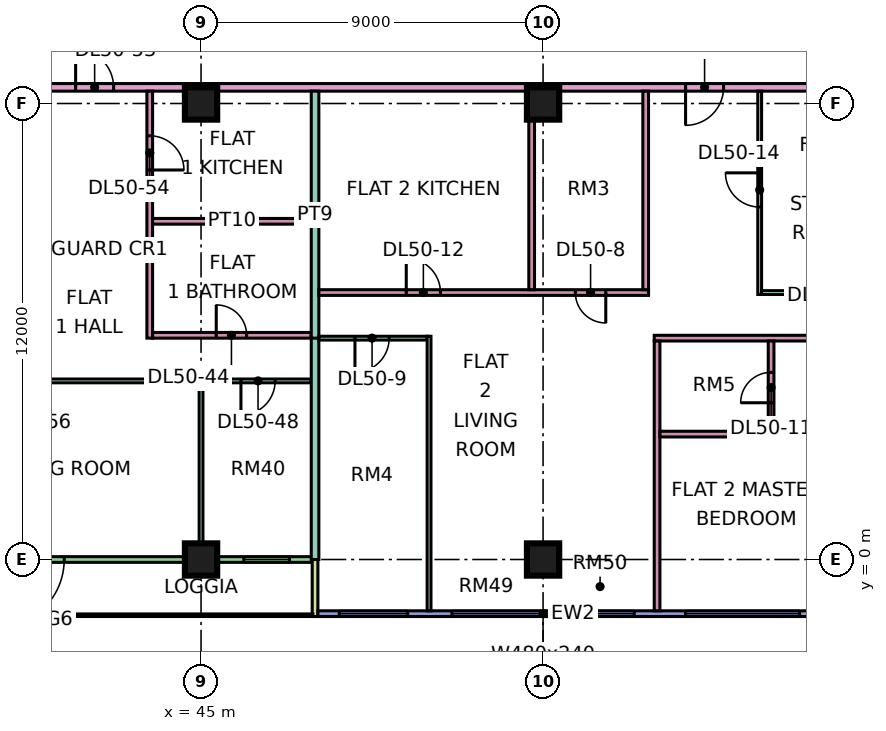
"""IFC4 building model, lengths in metres.
Left out: names, types, materials, properties, quantities, classifications, styles, units other than length and angle.
Written with IfcOpenShell. Run it as: python <this file> out.ifc"""

import sys

from ifc_helpers import new_model, si_unit, direction, frame, frame_2d, origin, origin_2d, place, context, subcontext, project, spatial, rectangle, extrude, element, fill, save


model = new_model("IFC4")
c1 = context("Model", 3, precision=1e-05, world=origin(), true_north=direction((0.0, 1.0)))
c2 = subcontext(c1, "Body", "Model", "MODEL_VIEW")
j1 = project(units=[si_unit("LENGTHUNIT", "METRE"), si_unit("PLANEANGLEUNIT", "RADIAN")], contexts=[c1])
p1 = place(None, origin())
s1 = spatial("IfcSite", under=j1, at=p1, CompositionType="ELEMENT")
p2 = place(p1, origin())
s2 = spatial("IfcBuilding", under=s1, at=p2, CompositionType="ELEMENT")
p3 = place(p2, frame((0.0, 0.0, 215.4)))
s3 = spatial("IfcBuildingStorey", under=s2, at=p3, CompositionType="ELEMENT", Elevation=215.4)
for number, where, z_axis, x_axis in (
    (1, (45.0, 0.0, 0.0), (0.0, 0.0, 1.0), (1.0, 0.0, 0.0)),
    (2, (45.0, 12.0, 0.0), (0.0, 0.0, 1.0), (1.0, 0.0, 0.0)),
    (3, (54.0, 0.0, 0.0), (0.0, 0.0, 1.0), (1.0, 0.0, 0.0)),
    (4, (54.0, 12.0, 0.0), (0.0, 0.0, 1.0), (1.0, 0.0, 0.0)),
):
    element("IfcColumn", number, at=place(p3, frame(where, z_axis=z_axis, x_axis=x_axis)), inside=s3, PredefinedType="COLUMN", context=c2, shape_type="SweptSolid", body=[
        extrude(rectangle(XDim=0.85, YDim=0.85, at=origin_2d()), origin(), (0.0, 0.0, 1.0), 3.75),
    ])
p4 = place(p3, frame((36.075, 0.0, 0.0), z_axis=(0.0, 0.0, 1.0), x_axis=(1.0, 0.0, 0.0)))
e5 = element("IfcWall", 5, at=p4, inside=s3, PredefinedType="SOLIDWALL", context=c2, shape_type="SweptSolid", body=[
    extrude(rectangle(XDim=11.85, YDim=0.15, at=frame_2d((5.925, 0.0))), origin(), (0.0, 0.0, 1.0), 3.35),
])
p5 = place(p4, frame((3.525, 0.0, 0.0)))
e6 = element("IfcOpeningElement", 6, at=p5, cuts=e5, PredefinedType="OPENING", context=c2, shape_type="SweptSolid", body=[
    extrude(rectangle(XDim=1.8, YDim=2.4, at=frame_2d((0.9, 1.2))), frame((0.0, 0.085, 0.0), z_axis=(0.0, -1.0, 0.0), x_axis=(1.0, 0.0, 0.0)), (0.0, 0.0, 1.0), 0.17),
])
p6 = place(p4, frame((10.05, 0.0, 0.45)))
e7 = element("IfcOpeningElement", 7, at=p6, cuts=e5, PredefinedType="OPENING", context=c2, shape_type="SweptSolid", body=[
    extrude(rectangle(XDim=1.2, YDim=2.4, at=frame_2d((0.6, 1.2))), frame((0.0, 0.085, 0.0), z_axis=(0.0, -1.0, 0.0), x_axis=(1.0, 0.0, 0.0)), (0.0, 0.0, 1.0), 0.17),
])
p7 = place(p3, frame((48.0, -1.5, 0.0), z_axis=(0.0, 0.0, 1.0), x_axis=(0.0, 1.0, 0.0)))
e8 = element("IfcWall", 8, at=p7, inside=s3, PredefinedType="SOLIDWALL", context=c2, shape_type="SweptSolid", body=[
    extrude(rectangle(XDim=1.5, YDim=0.15, at=frame_2d((0.75, 0.0))), origin(), (0.0, 0.0, 1.0), 3.35),
])
p8 = place(p3, frame((48.075, -1.425, 0.0), z_axis=(0.0, 0.0, 1.0), x_axis=(1.0, 0.0, 0.0)))
e9 = element("IfcWall", 9, at=p8, inside=s3, PredefinedType="SOLIDWALL", context=c2, shape_type="SweptSolid", body=[
    extrude(rectangle(XDim=13.425, YDim=0.15, at=frame_2d((6.712, 0.0))), origin(), (0.0, 0.0, 1.0), 3.35),
])
p9 = place(p8, frame((0.562, 0.0, 0.45)))
e10 = element("IfcOpeningElement", 10, at=p9, cuts=e9, PredefinedType="OPENING", context=c2, shape_type="SweptSolid", body=[
    extrude(rectangle(XDim=1.8, YDim=2.4, at=frame_2d((0.9, 1.2))), frame((0.0, 0.085, 0.0), z_axis=(0.0, -1.0, 0.0), x_axis=(1.0, 0.0, 0.0)), (0.0, 0.0, 1.0), 0.17),
])
p10 = place(p8, frame((3.525, 0.0, 0.45)))
e11 = element("IfcOpeningElement", 11, at=p10, cuts=e9, PredefinedType="OPENING", context=c2, shape_type="SweptSolid", body=[
    extrude(rectangle(XDim=4.8, YDim=2.4, at=frame_2d((2.4, 1.2))), frame((0.0, 0.085, 0.0), z_axis=(0.0, -1.0, 0.0), x_axis=(1.0, 0.0, 0.0)), (0.0, 0.0, 1.0), 0.17),
])
p11 = place(p8, frame((9.675, 0.0, 0.45)))
e12 = element("IfcOpeningElement", 12, at=p11, cuts=e9, PredefinedType="OPENING", context=c2, shape_type="SweptSolid", body=[
    extrude(rectangle(XDim=3.0, YDim=2.4, at=frame_2d((1.5, 1.2))), frame((0.0, 0.085, 0.0), z_axis=(0.0, -1.0, 0.0), x_axis=(1.0, 0.0, 0.0)), (0.0, 0.0, 1.0), 0.17),
])
p12 = place(p3, frame((33.05, 4.7, 0.0), z_axis=(0.0, 0.0, 1.0), x_axis=(1.0, 0.0, 0.0)))
e13 = element("IfcWall", 13, at=p12, inside=s3, PredefinedType="PARTITIONING", context=c2, shape_type="SweptSolid", body=[
    extrude(rectangle(XDim=14.85, YDim=0.1, at=frame_2d((7.425, 0.0))), origin(), (0.0, 0.0, 1.0), 3.35),
])
p13 = place(p12, frame((1.0, 0.0, 0.0)))
e14 = element("IfcOpeningElement", 14, at=p13, cuts=e13, PredefinedType="OPENING", context=c2, shape_type="SweptSolid", body=[
    extrude(rectangle(XDim=0.9, YDim=2.1, at=frame_2d((0.45, 1.05))), frame((0.0, 0.06, 0.0), z_axis=(0.0, -1.0, 0.0), x_axis=(1.0, 0.0, 0.0)), (0.0, 0.0, 1.0), 0.12),
])
p14 = place(p12, frame((13.0, 0.0, 0.0)))
e15 = element("IfcOpeningElement", 15, at=p14, cuts=e13, PredefinedType="OPENING", context=c2, shape_type="SweptSolid", body=[
    extrude(rectangle(XDim=0.9, YDim=2.1, at=frame_2d((0.45, 1.05))), frame((0.0, 0.06, 0.0), z_axis=(0.0, -1.0, 0.0), x_axis=(1.0, 0.0, 0.0)), (0.0, 0.0, 1.0), 0.12),
])
p15 = place(p12, frame((7.0, 0.0, 0.0)))
e16 = element("IfcOpeningElement", 16, at=p15, cuts=e13, PredefinedType="OPENING", context=c2, shape_type="SweptSolid", body=[
    extrude(rectangle(XDim=0.9, YDim=2.1, at=frame_2d((0.45, 1.05))), frame((0.0, 0.06, 0.0), z_axis=(0.0, -1.0, 0.0), x_axis=(1.0, 0.0, 0.0)), (0.0, 0.0, 1.0), 0.12),
])
p16 = place(p3, frame((40.65, 12.425, 0.0), z_axis=(0.0, 0.0, 1.0), x_axis=(1.0, 0.0, 0.0)))
e17 = element("IfcWall", 17, at=p16, inside=s3, PredefinedType="PARTITIONING", context=c2, shape_type="SweptSolid", body=[
    extrude(rectangle(XDim=22.276, YDim=0.2, at=frame_2d((11.138, 0.0))), origin(), (0.0, 0.0, 1.0), 3.35),
])
p17 = place(p16, frame((17.1, 0.0, 0.0)))
e18 = element("IfcOpeningElement", 18, at=p17, cuts=e17, PredefinedType="OPENING", context=c2, shape_type="SweptSolid", body=[
    extrude(rectangle(XDim=1.0, YDim=2.1, at=frame_2d((0.5, 1.05))), frame((0.0, 0.11, 0.0), z_axis=(0.0, -1.0, 0.0), x_axis=(1.0, 0.0, 0.0)), (0.0, 0.0, 1.0), 0.22),
])
p18 = place(p16, frame((1.05, 0.0, 0.0)))
e19 = element("IfcOpeningElement", 19, at=p18, cuts=e17, PredefinedType="OPENING", context=c2, shape_type="SweptSolid", body=[
    extrude(rectangle(XDim=1.0, YDim=2.1, at=frame_2d((0.5, 1.05))), frame((0.0, 0.11, 0.0), z_axis=(0.0, -1.0, 0.0), x_axis=(1.0, 0.0, 0.0)), (0.0, 0.0, 1.0), 0.22),
])
p19 = place(p3, frame((43.65, 5.825, 0.0), z_axis=(0.0, 0.0, 1.0), x_axis=(0.0, 1.0, 0.0)))
e20 = element("IfcWall", 20, at=p19, inside=s3, PredefinedType="PARTITIONING", context=c2, shape_type="SweptSolid", body=[
    extrude(rectangle(XDim=6.5, YDim=0.15, at=frame_2d((3.25, 0.0))), origin(), (0.0, 0.0, 1.0), 3.35),
])
p20 = place(p19, frame((4.425, 0.0, 0.0)))
e21 = element("IfcOpeningElement", 21, at=p20, cuts=e20, PredefinedType="OPENING", context=c2, shape_type="SweptSolid", body=[
    extrude(rectangle(XDim=0.9, YDim=2.1, at=frame_2d((0.45, 1.05))), frame((0.0, 0.085, 0.0), z_axis=(0.0, -1.0, 0.0), x_axis=(1.0, 0.0, 0.0)), (0.0, 0.0, 1.0), 0.17),
])
p21 = place(p3, frame((43.725, 5.9, 0.0), z_axis=(0.0, 0.0, 1.0), x_axis=(1.0, 0.0, 0.0)))
e22 = element("IfcWall", 22, at=p21, inside=s3, PredefinedType="PARTITIONING", context=c2, shape_type="SweptSolid", body=[
    extrude(rectangle(XDim=4.175, YDim=0.15, at=frame_2d((2.087, 0.0))), origin(), (0.0, 0.0, 1.0), 3.35),
])
p22 = place(p21, frame((1.675, 0.0, 0.0)))
e23 = element("IfcOpeningElement", 23, at=p22, cuts=e22, PredefinedType="OPENING", context=c2, shape_type="SweptSolid", body=[
    extrude(rectangle(XDim=0.8, YDim=2.1, at=frame_2d((0.4, 1.05))), frame((0.0, 0.085, 0.0), z_axis=(0.0, -1.0, 0.0), x_axis=(1.0, 0.0, 0.0)), (0.0, 0.0, 1.0), 0.17),
])
p23 = place(p3, frame((43.725, 8.9, 0.0), z_axis=(0.0, 0.0, 1.0), x_axis=(1.0, 0.0, 0.0)))
e24 = element("IfcWall", 24, at=p23, inside=s3, PredefinedType="PARTITIONING", context=c2, shape_type="SweptSolid", body=[
    extrude(rectangle(XDim=4.175, YDim=0.15, at=frame_2d((2.087, 0.0))), origin(), (0.0, 0.0, 1.0), 3.35),
])
p24 = place(p3, frame((45.0, 0.074, 0.0), z_axis=(0.0, 0.0, 1.0), x_axis=(0.0, 1.0, 0.0)))
e25 = element("IfcWall", 25, at=p24, inside=s3, PredefinedType="PARTITIONING", context=c2, shape_type="SweptSolid", body=[
    extrude(rectangle(XDim=4.576, YDim=0.1, at=frame_2d((2.288, 0.0))), origin(), (0.0, 0.0, 1.0), 3.35),
])
p25 = place(p3, frame((48.0, 0.0, 0.0), z_axis=(0.0, 0.0, 1.0), x_axis=(0.0, 1.0, 0.0)))
e26 = element("IfcWall", 26, at=p25, inside=s3, PredefinedType="PARTITIONING", context=c2, shape_type="SweptSolid", body=[
    extrude(rectangle(XDim=5.875, YDim=0.2, at=frame_2d((2.938, 0.0))), origin(), (0.0, 0.0, 1.0), 3.35),
])
p26 = place(p3, frame((48.0, 5.825, 0.0), z_axis=(0.0, 0.0, 1.0), x_axis=(0.0, 1.0, 0.0)))
e27 = element("IfcWall", 27, at=p26, inside=s3, PredefinedType="PARTITIONING", context=c2, shape_type="SweptSolid", body=[
    extrude(rectangle(XDim=6.5, YDim=0.2, at=frame_2d((3.25, 0.0))), origin(), (0.0, 0.0, 1.0), 3.35),
])
p27 = place(p3, frame((48.1, 5.825, 0.0), z_axis=(0.0, 0.0, 1.0), x_axis=(1.0, 0.0, 0.0)))
e28 = element("IfcWall", 28, at=p27, inside=s3, PredefinedType="PARTITIONING", context=c2, shape_type="SweptSolid", body=[
    extrude(rectangle(XDim=2.85, YDim=0.1, at=frame_2d((1.425, 0.0))), origin(), (0.0, 0.0, 1.0), 3.35),
])
p28 = place(p27, frame((0.95, 0.0, 0.0)))
e29 = element("IfcOpeningElement", 29, at=p28, cuts=e28, PredefinedType="OPENING", context=c2, shape_type="SweptSolid", body=[
    extrude(rectangle(XDim=0.9, YDim=2.1, at=frame_2d((0.45, 1.05))), frame((0.0, 0.06, 0.0), z_axis=(0.0, -1.0, 0.0), x_axis=(1.0, 0.0, 0.0)), (0.0, 0.0, 1.0), 0.12),
])
p29 = place(p3, frame((48.1, 7.025, 0.0), z_axis=(0.0, 0.0, 1.0), x_axis=(1.0, 0.0, 0.0)))
e30 = element("IfcWall", 30, at=p29, inside=s3, PredefinedType="PARTITIONING", context=c2, shape_type="SweptSolid", body=[
    extrude(rectangle(XDim=8.675, YDim=0.15, at=frame_2d((4.337, 0.0))), origin(), (0.0, 0.0, 1.0), 3.35),
])
p30 = place(p29, frame((6.75, 0.0, 0.0)))
e31 = element("IfcOpeningElement", 31, at=p30, cuts=e30, PredefinedType="OPENING", context=c2, shape_type="SweptSolid", body=[
    extrude(rectangle(XDim=0.8, YDim=2.1, at=frame_2d((0.4, 1.05))), frame((0.0, 0.085, 0.0), z_axis=(0.0, -1.0, 0.0), x_axis=(1.0, 0.0, 0.0)), (0.0, 0.0, 1.0), 0.17),
])
p31 = place(p29, frame((2.3, 0.0, 0.0)))
e32 = element("IfcOpeningElement", 32, at=p31, cuts=e30, PredefinedType="OPENING", context=c2, shape_type="SweptSolid", body=[
    extrude(rectangle(XDim=0.9, YDim=2.1, at=frame_2d((0.45, 1.05))), frame((0.0, 0.085, 0.0), z_axis=(0.0, -1.0, 0.0), x_axis=(1.0, 0.0, 0.0)), (0.0, 0.0, 1.0), 0.17),
])
p32 = place(p3, frame((51.0, -1.35, 0.0), z_axis=(0.0, 0.0, 1.0), x_axis=(0.0, 1.0, 0.0)))
e33 = element("IfcWall", 33, at=p32, inside=s3, PredefinedType="PARTITIONING", context=c2, shape_type="SweptSolid", body=[
    extrude(rectangle(XDim=7.225, YDim=0.1, at=frame_2d((3.613, 0.0))), origin(), (0.0, 0.0, 1.0), 3.35),
])
for number, where, z_axis, x_axis in (
    (34, (53.7, 7.1, 0.0), (0.0, 0.0, 1.0), (0.0, 1.0, 0.0)),
    (35, (56.7, 7.1, 0.0), (0.0, 0.0, 1.0), (0.0, 1.0, 0.0)),
):
    element("IfcWall", number, at=place(p3, frame(where, z_axis=z_axis, x_axis=x_axis)), inside=s3, PredefinedType="PARTITIONING", context=c2, shape_type="SweptSolid", body=[
        extrude(rectangle(XDim=5.225, YDim=0.15, at=frame_2d((2.612, 0.0))), origin(), (0.0, 0.0, 1.0), 3.35),
    ])
p33 = place(p3, frame((56.925, 5.825, 0.0), z_axis=(0.0, 0.0, 1.0), x_axis=(1.0, 0.0, 0.0)))
e36 = element("IfcWall", 36, at=p33, inside=s3, PredefinedType="PARTITIONING", context=c2, shape_type="SweptSolid", body=[
    extrude(rectangle(XDim=7.425, YDim=0.15, at=frame_2d((3.712, 0.0))), origin(), (0.0, 0.0, 1.0), 3.35),
])
p34 = place(p33, frame((4.125, 0.0, 0.0)))
e37 = element("IfcOpeningElement", 37, at=p34, cuts=e36, PredefinedType="OPENING", context=c2, shape_type="SweptSolid", body=[
    extrude(rectangle(XDim=0.9, YDim=2.1, at=frame_2d((0.45, 1.05))), frame((0.0, 0.085, 0.0), z_axis=(0.0, -1.0, 0.0), x_axis=(1.0, 0.0, 0.0)), (0.0, 0.0, 1.0), 0.17),
])
p35 = place(p3, frame((57.0, -1.35, 0.0), z_axis=(0.0, 0.0, 1.0), x_axis=(0.0, 1.0, 0.0)))
e38 = element("IfcWall", 38, at=p35, inside=s3, PredefinedType="PARTITIONING", context=c2, shape_type="SweptSolid", body=[
    extrude(rectangle(XDim=7.1, YDim=0.15, at=frame_2d((3.55, 0.0))), origin(), (0.0, 0.0, 1.0), 3.35),
])
p36 = place(p3, frame((57.075, 3.3, 0.0), z_axis=(0.0, 0.0, 1.0), x_axis=(1.0, 0.0, 0.0)))
e39 = element("IfcWall", 39, at=p36, inside=s3, PredefinedType="PARTITIONING", context=c2, shape_type="SweptSolid", body=[
    extrude(rectangle(XDim=3.0, YDim=0.15, at=frame_2d((1.5, 0.0))), origin(), (0.0, 0.0, 1.0), 3.35),
])
p37 = place(p3, frame((59.7, 6.975, 0.0), z_axis=(0.0, 0.0, 1.0), x_axis=(0.0, 1.0, 0.0)))
e40 = element("IfcWall", 40, at=p37, inside=s3, PredefinedType="PARTITIONING", context=c2, shape_type="SweptSolid", body=[
    extrude(rectangle(XDim=5.35, YDim=0.1, at=frame_2d((2.675, 0.0))), origin(), (0.0, 0.0, 1.0), 3.35),
])
p38 = place(p37, frame((2.3, 0.0, 0.0)))
e41 = element("IfcOpeningElement", 41, at=p38, cuts=e40, PredefinedType="OPENING", context=c2, shape_type="SweptSolid", body=[
    extrude(rectangle(XDim=0.9, YDim=2.1, at=frame_2d((0.45, 1.05))), frame((0.0, 0.06, 0.0), z_axis=(0.0, -1.0, 0.0), x_axis=(1.0, 0.0, 0.0)), (0.0, 0.0, 1.0), 0.12),
])
p39 = place(p3, frame((59.75, 7.025, 0.0), z_axis=(0.0, 0.0, 1.0), x_axis=(1.0, 0.0, 0.0)))
e42 = element("IfcWall", 42, at=p39, inside=s3, PredefinedType="PARTITIONING", context=c2, shape_type="SweptSolid", body=[
    extrude(rectangle(XDim=4.6, YDim=0.1, at=frame_2d((2.3, 0.0))), origin(), (0.0, 0.0, 1.0), 3.35),
])
p40 = place(p3, frame((60.0, 3.375, 0.0), z_axis=(0.0, 0.0, 1.0), x_axis=(0.0, 1.0, 0.0)))
e43 = element("IfcWall", 43, at=p40, inside=s3, PredefinedType="PARTITIONING", context=c2, shape_type="SweptSolid", body=[
    extrude(rectangle(XDim=2.375, YDim=0.15, at=frame_2d((1.188, 0.0))), origin(), (0.0, 0.0, 1.0), 3.35),
])
p41 = place(p40, frame((0.75, 0.0, 0.0)))
e44 = element("IfcOpeningElement", 44, at=p41, cuts=e43, PredefinedType="OPENING", context=c2, shape_type="SweptSolid", body=[
    extrude(rectangle(XDim=0.8, YDim=2.1, at=frame_2d((0.4, 1.05))), frame((0.0, 0.085, 0.0), z_axis=(0.0, -1.0, 0.0), x_axis=(1.0, 0.0, 0.0)), (0.0, 0.0, 1.0), 0.17),
])
p42 = place(p5, frame((1.8, 0.0, 0.0), z_axis=(0.0, 0.0, 1.0), x_axis=(-1.0, 0.0, 0.0)))
e45 = element("IfcDoor", 45, at=p42, inside=s3, OperationType="DOUBLE_DOOR_SINGLE_SWING", PredefinedType="DOOR", context=c2, shape_type="SweptSolid", body=[
    extrude(rectangle(XDim=1.8, YDim=2.4, at=frame_2d((0.9, 1.2))), frame((0.0, 0.025, 0.0), z_axis=(0.0, -1.0, 0.0), x_axis=(1.0, 0.0, 0.0)), (0.0, 0.0, 1.0), 0.05),
])
fill(e6, e45)
p43 = place(p6, origin())
e46 = element("IfcWindow", 46, at=p43, inside=s3, PartitioningType="SINGLE_PANEL", PredefinedType="WINDOW", context=c2, shape_type="SweptSolid", body=[
    extrude(rectangle(XDim=1.2, YDim=2.4, at=frame_2d((0.6, 1.2))), frame((0.0, 0.03, 0.0), z_axis=(0.0, -1.0, 0.0), x_axis=(1.0, 0.0, 0.0)), (0.0, 0.0, 1.0), 0.06),
])
fill(e7, e46)
p44 = place(p9, origin())
e47 = element("IfcWindow", 47, at=p44, inside=s3, PartitioningType="SINGLE_PANEL", PredefinedType="WINDOW", context=c2, shape_type="SweptSolid", body=[
    extrude(rectangle(XDim=1.8, YDim=2.4, at=frame_2d((0.9, 1.2))), frame((0.0, 0.03, 0.0), z_axis=(0.0, -1.0, 0.0), x_axis=(1.0, 0.0, 0.0)), (0.0, 0.0, 1.0), 0.06),
])
fill(e10, e47)
p45 = place(p10, origin())
e48 = element("IfcWindow", 48, at=p45, inside=s3, PartitioningType="SINGLE_PANEL", PredefinedType="WINDOW", context=c2, shape_type="SweptSolid", body=[
    extrude(rectangle(XDim=4.8, YDim=2.4, at=frame_2d((2.4, 1.2))), frame((0.0, 0.03, 0.0), z_axis=(0.0, -1.0, 0.0), x_axis=(1.0, 0.0, 0.0)), (0.0, 0.0, 1.0), 0.06),
])
fill(e11, e48)
p46 = place(p11, origin())
e49 = element("IfcWindow", 49, at=p46, inside=s3, PartitioningType="SINGLE_PANEL", PredefinedType="WINDOW", context=c2, shape_type="SweptSolid", body=[
    extrude(rectangle(XDim=3.0, YDim=2.4, at=frame_2d((1.5, 1.2))), frame((0.0, 0.03, 0.0), z_axis=(0.0, -1.0, 0.0), x_axis=(1.0, 0.0, 0.0)), (0.0, 0.0, 1.0), 0.06),
])
fill(e12, e49)
p47 = place(p30, origin())
e50 = element("IfcDoor", 50, at=p47, inside=s3, OperationType="SINGLE_SWING_RIGHT", PredefinedType="DOOR", context=c2, shape_type="SweptSolid", body=[
    extrude(rectangle(XDim=0.8, YDim=2.1, at=frame_2d((0.4, 1.05))), frame((0.0, 0.025, 0.0), z_axis=(0.0, -1.0, 0.0), x_axis=(1.0, 0.0, 0.0)), (0.0, 0.0, 1.0), 0.05),
])
fill(e31, e50)
p48 = place(p28, frame((0.9, 0.0, 0.0), z_axis=(0.0, 0.0, 1.0), x_axis=(-1.0, 0.0, 0.0)))
e51 = element("IfcDoor", 51, at=p48, inside=s3, OperationType="SINGLE_SWING_LEFT", PredefinedType="DOOR", context=c2, shape_type="SweptSolid", body=[
    extrude(rectangle(XDim=0.9, YDim=2.1, at=frame_2d((0.45, 1.05))), frame((0.0, 0.025, 0.0), z_axis=(0.0, -1.0, 0.0), x_axis=(1.0, 0.0, 0.0)), (0.0, 0.0, 1.0), 0.05),
])
fill(e29, e51)
p49 = place(p41, origin())
e52 = element("IfcDoor", 52, at=p49, inside=s3, OperationType="SINGLE_SWING_LEFT", PredefinedType="DOOR", context=c2, shape_type="SweptSolid", body=[
    extrude(rectangle(XDim=0.8, YDim=2.1, at=frame_2d((0.4, 1.05))), frame((0.0, 0.025, 0.0), z_axis=(0.0, -1.0, 0.0), x_axis=(1.0, 0.0, 0.0)), (0.0, 0.0, 1.0), 0.05),
])
fill(e44, e52)
p50 = place(p31, origin())
e53 = element("IfcDoor", 53, at=p50, inside=s3, OperationType="SINGLE_SWING_LEFT", PredefinedType="DOOR", context=c2, shape_type="SweptSolid", body=[
    extrude(rectangle(XDim=0.9, YDim=2.1, at=frame_2d((0.45, 1.05))), frame((0.0, 0.025, 0.0), z_axis=(0.0, -1.0, 0.0), x_axis=(1.0, 0.0, 0.0)), (0.0, 0.0, 1.0), 0.05),
])
fill(e32, e53)
p51 = place(p17, frame((1.0, 0.0, 0.0), z_axis=(0.0, 0.0, 1.0), x_axis=(-1.0, 0.0, 0.0)))
e54 = element("IfcDoor", 54, at=p51, inside=s3, OperationType="SINGLE_SWING_LEFT", PredefinedType="DOOR", context=c2, shape_type="SweptSolid", body=[
    extrude(rectangle(XDim=1.0, YDim=2.1, at=frame_2d((0.5, 1.05))), frame((0.0, 0.025, 0.0), z_axis=(0.0, -1.0, 0.0), x_axis=(1.0, 0.0, 0.0)), (0.0, 0.0, 1.0), 0.05),
])
fill(e18, e54)
p52 = place(p38, frame((0.9, 0.0, 0.0), z_axis=(0.0, 0.0, 1.0), x_axis=(-1.0, 0.0, 0.0)))
e55 = element("IfcDoor", 55, at=p52, inside=s3, OperationType="SINGLE_SWING_RIGHT", PredefinedType="DOOR", context=c2, shape_type="SweptSolid", body=[
    extrude(rectangle(XDim=0.9, YDim=2.1, at=frame_2d((0.45, 1.05))), frame((0.0, 0.025, 0.0), z_axis=(0.0, -1.0, 0.0), x_axis=(1.0, 0.0, 0.0)), (0.0, 0.0, 1.0), 0.05),
])
fill(e41, e55)
p53 = place(p22, origin())
e56 = element("IfcDoor", 56, at=p53, inside=s3, OperationType="SINGLE_SWING_LEFT", PredefinedType="DOOR", context=c2, shape_type="SweptSolid", body=[
    extrude(rectangle(XDim=0.8, YDim=2.1, at=frame_2d((0.4, 1.05))), frame((0.0, 0.025, 0.0), z_axis=(0.0, -1.0, 0.0), x_axis=(1.0, 0.0, 0.0)), (0.0, 0.0, 1.0), 0.05),
])
fill(e23, e56)
p54 = place(p14, frame((0.9, 0.0, 0.0), z_axis=(0.0, 0.0, 1.0), x_axis=(-1.0, 0.0, 0.0)))
e57 = element("IfcDoor", 57, at=p54, inside=s3, OperationType="SINGLE_SWING_LEFT", PredefinedType="DOOR", context=c2, shape_type="SweptSolid", body=[
    extrude(rectangle(XDim=0.9, YDim=2.1, at=frame_2d((0.45, 1.05))), frame((0.0, 0.025, 0.0), z_axis=(0.0, -1.0, 0.0), x_axis=(1.0, 0.0, 0.0)), (0.0, 0.0, 1.0), 0.05),
])
fill(e15, e57)
p55 = place(p18, origin())
e58 = element("IfcDoor", 58, at=p55, inside=s3, OperationType="SINGLE_SWING_LEFT", PredefinedType="DOOR", context=c2, shape_type="SweptSolid", body=[
    extrude(rectangle(XDim=1.0, YDim=2.1, at=frame_2d((0.5, 1.05))), frame((0.0, 0.025, 0.0), z_axis=(0.0, -1.0, 0.0), x_axis=(1.0, 0.0, 0.0)), (0.0, 0.0, 1.0), 0.05),
])
fill(e19, e58)
p56 = place(p20, frame((0.9, 0.0, 0.0), z_axis=(0.0, 0.0, 1.0), x_axis=(-1.0, 0.0, 0.0)))
e59 = element("IfcDoor", 59, at=p56, inside=s3, OperationType="SINGLE_SWING_LEFT", PredefinedType="DOOR", context=c2, shape_type="SweptSolid", body=[
    extrude(rectangle(XDim=0.9, YDim=2.1, at=frame_2d((0.45, 1.05))), frame((0.0, 0.025, 0.0), z_axis=(0.0, -1.0, 0.0), x_axis=(1.0, 0.0, 0.0)), (0.0, 0.0, 1.0), 0.05),
])
fill(e21, e59)
save(model, sys.argv[1])
